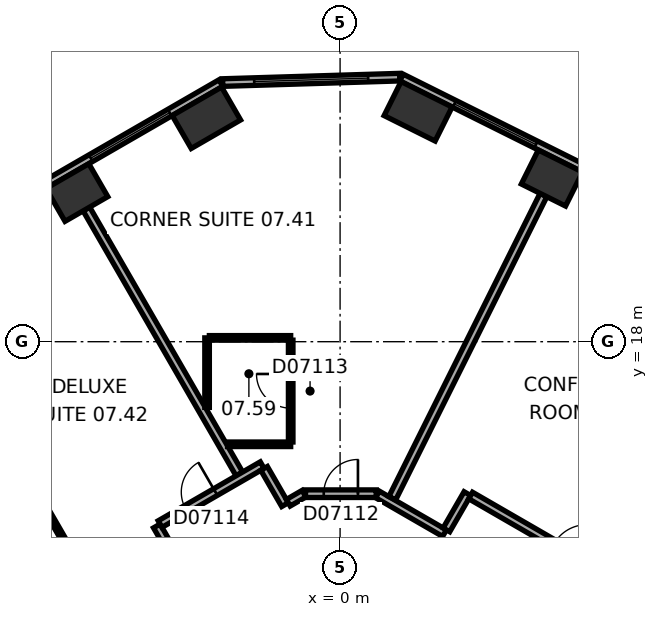
"""IFC4 building model, lengths in metres.
Left out: names, types, materials, properties, quantities, classifications, styles, units other than length and angle.
Written with IfcOpenShell. Run it as: python <this file> out.ifc"""

import sys

from ifc_helpers import new_model, si_unit, direction, frame, frame_2d, origin, origin_2d, place, context, subcontext, project, spatial, rectangle, extrude, element, fill, save


model = new_model("IFC4")
c1 = context("Model", 3, precision=1e-05, world=origin(), true_north=direction((0.0, 1.0)))
c2 = subcontext(c1, "Body", "Model", "MODEL_VIEW")
j1 = project(units=[si_unit("LENGTHUNIT", "METRE"), si_unit("PLANEANGLEUNIT", "RADIAN")], contexts=[c1])
p1 = place(None, origin())
s1 = spatial("IfcSite", under=j1, at=p1, CompositionType="ELEMENT")
p2 = place(p1, origin())
s2 = spatial("IfcBuilding", under=s1, at=p2, CompositionType="ELEMENT")
p3 = place(p2, frame((0.0, 0.0, 44.0)))
s3 = spatial("IfcBuildingStorey", under=s2, at=p3, CompositionType="ELEMENT", Elevation=44.0)
p4 = place(p3, frame((5.574, 22.306, 0.0), z_axis=(0.0, 0.0, 1.0), x_axis=(-0.894934361602, 0.44619781311, 0.0)))
e1 = element("IfcColumn", 1, at=p4, inside=s3, PredefinedType="COLUMN", context=c2, shape_type="SweptSolid", body=[
    extrude(rectangle(XDim=1.3, YDim=1.0, at=origin_2d()), origin(), (0.0, 0.0, 1.0), 3.3),
])
for number, where, z_axis, x_axis in (
    (2, (2.053, 24.062, 0.0), (0.0, 0.0, 1.0), (-0.895, 0.446, 0.0)),
    (3, (-3.518, 23.892, 0.0), (0.0, 0.0, 1.0), (-0.866, -0.5, 0.0)),
):
    element("IfcColumn", number, at=place(p3, frame(where, z_axis=z_axis, x_axis=x_axis)), inside=s3, PredefinedType="COLUMN", context=c2, shape_type="SweptSolid", body=[
        extrude(rectangle(XDim=1.5, YDim=1.0, at=origin_2d()), origin(), (0.0, 0.0, 1.0), 3.3),
    ])
p5 = place(p3, frame((-6.926, 21.925, 0.0), z_axis=(0.0, 0.0, 1.0), x_axis=(-0.866025403784, -0.5, 0.0)))
e4 = element("IfcColumn", 4, at=p5, inside=s3, PredefinedType="COLUMN", context=c2, shape_type="SweptSolid", body=[
    extrude(rectangle(XDim=1.3, YDim=1.0, at=origin_2d()), origin(), (0.0, 0.0, 1.0), 3.3),
])
p6 = place(p3, frame((20.63, 15.47, 0.0), z_axis=(0.0, 0.0, 1.0), x_axis=(-0.894934518609, 0.446197498203, 0.0)))
e5 = element("IfcWall", 5, at=p6, inside=s3, PredefinedType="STANDARD", context=c2, shape_type="SweptSolid", body=[
    extrude(rectangle(XDim=21.246, YDim=0.2, at=frame_2d((10.623, 0.0))), origin(), (0.0, 0.0, 1.0), 3.3),
])
p7 = place(p6, frame((1.553, 0.0, 0.8)))
e6 = element("IfcOpeningElement", 6, at=p7, cuts=e5, PredefinedType="OPENING", context=c2, shape_type="SweptSolid", body=[
    extrude(rectangle(XDim=2.4, YDim=1.7, at=frame_2d((1.2, 0.85))), frame((0.0, 0.11, 0.0), z_axis=(0.0, -1.0, 0.0), x_axis=(1.0, 0.0, 0.0)), (0.0, 0.0, 1.0), 0.22),
])
p8 = place(p6, frame((5.488, 0.0, 0.8)))
e7 = element("IfcOpeningElement", 7, at=p8, cuts=e5, PredefinedType="OPENING", context=c2, shape_type="SweptSolid", body=[
    extrude(rectangle(XDim=2.4, YDim=1.7, at=frame_2d((1.2, 0.85))), frame((0.0, 0.11, 0.0), z_axis=(0.0, -1.0, 0.0), x_axis=(1.0, 0.0, 0.0)), (0.0, 0.0, 1.0), 0.22),
])
p9 = place(p6, frame((9.422, 0.0, 0.8)))
e8 = element("IfcOpeningElement", 8, at=p9, cuts=e5, PredefinedType="OPENING", context=c2, shape_type="SweptSolid", body=[
    extrude(rectangle(XDim=2.4, YDim=1.7, at=frame_2d((1.2, 0.85))), frame((0.0, 0.11, 0.0), z_axis=(0.0, -1.0, 0.0), x_axis=(1.0, 0.0, 0.0)), (0.0, 0.0, 1.0), 0.22),
])
p10 = place(p6, frame((13.357, 0.0, 0.8)))
e9 = element("IfcOpeningElement", 9, at=p10, cuts=e5, PredefinedType="OPENING", context=c2, shape_type="SweptSolid", body=[
    extrude(rectangle(XDim=2.4, YDim=1.7, at=frame_2d((1.2, 0.85))), frame((0.0, 0.11, 0.0), z_axis=(0.0, -1.0, 0.0), x_axis=(1.0, 0.0, 0.0)), (0.0, 0.0, 1.0), 0.22),
])
p11 = place(p6, frame((17.292, 0.0, 0.8)))
e10 = element("IfcOpeningElement", 10, at=p11, cuts=e5, PredefinedType="OPENING", context=c2, shape_type="SweptSolid", body=[
    extrude(rectangle(XDim=2.4, YDim=1.7, at=frame_2d((1.2, 0.85))), frame((0.0, 0.11, 0.0), z_axis=(0.0, -1.0, 0.0), x_axis=(1.0, 0.0, 0.0)), (0.0, 0.0, 1.0), 0.22),
])
p12 = place(p3, frame((1.568, 24.961, 0.0), z_axis=(0.0, 0.0, 1.0), x_axis=(-0.999533359013, -0.030546099927, 0.0)))
e11 = element("IfcWall", 11, at=p12, inside=s3, PredefinedType="STANDARD", context=c2, shape_type="SweptSolid", body=[
    extrude(rectangle(XDim=4.66, YDim=0.2, at=frame_2d((2.33, 0.0))), origin(), (0.0, 0.0, 1.0), 3.3),
])
p13 = place(p12, frame((0.83, 0.0, 0.8)))
e12 = element("IfcOpeningElement", 12, at=p13, cuts=e11, PredefinedType="OPENING", context=c2, shape_type="SweptSolid", body=[
    extrude(rectangle(XDim=3.0, YDim=1.7, at=frame_2d((1.5, 0.85))), frame((0.0, 0.11, 0.0), z_axis=(0.0, -1.0, 0.0), x_axis=(1.0, 0.0, 0.0)), (0.0, 0.0, 1.0), 0.22),
])
p14 = place(p3, frame((-3.136, 24.805, 0.0), z_axis=(0.0, 0.0, 1.0), x_axis=(-0.866028291626, -0.499994998079, 0.0)))
e13 = element("IfcWall", 13, at=p14, inside=s3, PredefinedType="STANDARD", context=c2, shape_type="SweptSolid", body=[
    extrude(rectangle(XDim=21.246, YDim=0.2, at=frame_2d((10.623, 0.0))), origin(), (0.0, 0.0, 1.0), 3.3),
])
p15 = place(p14, frame((1.555, 0.0, 0.8)))
e14 = element("IfcOpeningElement", 14, at=p15, cuts=e13, PredefinedType="OPENING", context=c2, shape_type="SweptSolid", body=[
    extrude(rectangle(XDim=2.4, YDim=1.7, at=frame_2d((1.2, 0.85))), frame((0.0, 0.11, 0.0), z_axis=(0.0, -1.0, 0.0), x_axis=(1.0, 0.0, 0.0)), (0.0, 0.0, 1.0), 0.22),
])
p16 = place(p14, frame((5.489, 0.0, 0.8)))
e15 = element("IfcOpeningElement", 15, at=p16, cuts=e13, PredefinedType="OPENING", context=c2, shape_type="SweptSolid", body=[
    extrude(rectangle(XDim=2.4, YDim=1.7, at=frame_2d((1.2, 0.85))), frame((0.0, 0.11, 0.0), z_axis=(0.0, -1.0, 0.0), x_axis=(1.0, 0.0, 0.0)), (0.0, 0.0, 1.0), 0.22),
])
p17 = place(p14, frame((9.424, 0.0, 0.8)))
e16 = element("IfcOpeningElement", 16, at=p17, cuts=e13, PredefinedType="OPENING", context=c2, shape_type="SweptSolid", body=[
    extrude(rectangle(XDim=2.4, YDim=1.7, at=frame_2d((1.2, 0.85))), frame((0.0, 0.11, 0.0), z_axis=(0.0, -1.0, 0.0), x_axis=(1.0, 0.0, 0.0)), (0.0, 0.0, 1.0), 0.22),
])
p18 = place(p14, frame((13.358, 0.0, 0.8)))
e17 = element("IfcOpeningElement", 17, at=p18, cuts=e13, PredefinedType="OPENING", context=c2, shape_type="SweptSolid", body=[
    extrude(rectangle(XDim=2.4, YDim=1.7, at=frame_2d((1.2, 0.85))), frame((0.0, 0.11, 0.0), z_axis=(0.0, -1.0, 0.0), x_axis=(1.0, 0.0, 0.0)), (0.0, 0.0, 1.0), 0.22),
])
p19 = place(p14, frame((17.293, 0.0, 0.8)))
e18 = element("IfcOpeningElement", 18, at=p19, cuts=e13, PredefinedType="OPENING", context=c2, shape_type="SweptSolid", body=[
    extrude(rectangle(XDim=2.4, YDim=1.7, at=frame_2d((1.2, 0.85))), frame((0.0, 0.11, 0.0), z_axis=(0.0, -1.0, 0.0), x_axis=(1.0, 0.0, 0.0)), (0.0, 0.0, 1.0), 0.22),
])
p20 = place(p3, frame((-7.687, 13.506, 0.0), z_axis=(0.0, 0.0, 1.0), x_axis=(0.499985389037, -0.866033839264, 0.0)))
e19 = element("IfcWall", 19, at=p20, inside=s3, PredefinedType="PARTITIONING", context=c2, shape_type="SweptSolid", body=[
    extrude(rectangle(XDim=2.84, YDim=0.12, at=frame_2d((1.42, 0.0))), origin(), (0.0, 0.0, 1.0), 2.6),
])
p21 = place(p20, frame((0.97, 0.0, 0.0)))
e20 = element("IfcOpeningElement", 20, at=p21, cuts=e19, PredefinedType="OPENING", context=c2, shape_type="SweptSolid", body=[
    extrude(rectangle(XDim=0.9, YDim=2.1, at=frame_2d((0.45, 1.05))), frame((0.0, 0.07, 0.0), z_axis=(0.0, -1.0, 0.0), x_axis=(1.0, 0.0, 0.0)), (0.0, 0.0, 1.0), 0.14),
])
p22 = place(p3, frame((-6.676, 21.492, 0.0), z_axis=(0.0, 0.0, 1.0), x_axis=(0.500011263043, -0.866018900966, 0.0)))
e21 = element("IfcWall", 21, at=p22, inside=s3, PredefinedType="PARTITIONING", context=c2, shape_type="SweptSolid", body=[
    extrude(rectangle(XDim=8.049, YDim=0.2, at=frame_2d((4.024, 0.0))), origin(), (0.0, 0.0, 1.0), 3.05),
])
p23 = place(p3, frame((-4.823, 13.152, 0.0), z_axis=(0.0, 0.0, 1.0), x_axis=(0.499986357472, -0.866033280158, 0.0)))
e22 = element("IfcWall", 22, at=p23, inside=s3, PredefinedType="PARTITIONING", context=c2, shape_type="SweptSolid", body=[
    extrude(rectangle(XDim=1.201, YDim=0.2, at=frame_2d((0.601, 0.0))), origin(), (0.0, 0.0, 1.0), 3.05),
])
p24 = place(p3, frame((-3.5, 16.271, 0.0), z_axis=(0.0, 0.0, 1.0), x_axis=(0.0, 1.0, 0.0)))
e23 = element("IfcWall", 23, at=p24, inside=s3, PredefinedType="PARTITIONING", context=c2, shape_type="SweptSolid", body=[
    extrude(rectangle(XDim=1.829, YDim=0.12, at=frame_2d((0.915, 0.0))), origin(), (0.0, 0.0, 1.0), 3.05),
])
p25 = place(p3, frame((-3.44, 18.101, 0.0), z_axis=(0.0, 0.0, 1.0), x_axis=(1.0, 0.0, 0.0)))
e24 = element("IfcWall", 24, at=p25, inside=s3, PredefinedType="PARTITIONING", context=c2, shape_type="SweptSolid", body=[
    extrude(rectangle(XDim=2.14, YDim=0.12, at=frame_2d((1.07, 0.0))), origin(), (0.0, 0.0, 1.0), 3.05),
])
p26 = place(p3, frame((-2.05, 14.752, 0.0), z_axis=(0.0, 0.0, 1.0), x_axis=(-0.866030936828, -0.499990416364, 0.0)))
e25 = element("IfcWall", 25, at=p26, inside=s3, PredefinedType="PARTITIONING", context=c2, shape_type="SweptSolid", body=[
    extrude(rectangle(XDim=3.102, YDim=0.2, at=frame_2d((1.551, 0.0))), origin(), (0.0, 0.0, 1.0), 3.05),
])
p27 = place(p26, frame((1.419, 0.0, 0.0)))
e26 = element("IfcOpeningElement", 26, at=p27, cuts=e25, PredefinedType="OPENING", context=c2, shape_type="SweptSolid", body=[
    extrude(rectangle(XDim=0.9, YDim=2.1, at=frame_2d((0.45, 1.05))), frame((0.0, 0.11, 0.0), z_axis=(0.0, -1.0, 0.0), x_axis=(1.0, 0.0, 0.0)), (0.0, 0.0, 1.0), 0.22),
])
p28 = place(p3, frame((-1.449, 13.712, 0.0), z_axis=(0.0, 0.0, 1.0), x_axis=(-0.499978356969, 0.866037899034, 0.0)))
e27 = element("IfcWall", 27, at=p28, inside=s3, PredefinedType="PARTITIONING", context=c2, shape_type="SweptSolid", body=[
    extrude(rectangle(XDim=1.101, YDim=0.2, at=frame_2d((0.551, 0.0))), origin(), (0.0, 0.0, 1.0), 3.05),
])
p29 = place(p3, frame((-1.3, 15.301, 0.0), z_axis=(0.0, 0.0, 1.0), x_axis=(-1.0, 0.0, 0.0)))
e28 = element("IfcWall", 28, at=p29, inside=s3, PredefinedType="PARTITIONING", context=c2, shape_type="SweptSolid", body=[
    extrude(rectangle(XDim=1.661, YDim=0.12, at=frame_2d((0.831, 0.0))), origin(), (0.0, 0.0, 1.0), 3.05),
])
p30 = place(p3, frame((-1.3, 18.041, 0.0), z_axis=(0.0, 0.0, 1.0), x_axis=(0.0, -1.0, 0.0)))
e29 = element("IfcWall", 29, at=p30, inside=s3, PredefinedType="PARTITIONING", context=c2, shape_type="SweptSolid", body=[
    extrude(rectangle(XDim=2.68, YDim=0.12, at=frame_2d((1.34, 0.0))), origin(), (0.0, 0.0, 1.0), 3.05),
])
p31 = place(p30, frame((0.89, 0.0, 0.0)))
e30 = element("IfcOpeningElement", 30, at=p31, cuts=e29, PredefinedType="OPENING", context=c2, shape_type="SweptSolid", body=[
    extrude(rectangle(XDim=0.9, YDim=2.1, at=frame_2d((0.45, 1.05))), frame((0.0, 0.07, 0.0), z_axis=(0.0, -1.0, 0.0), x_axis=(1.0, 0.0, 0.0)), (0.0, 0.0, 1.0), 0.14),
])
p32 = place(p3, frame((-0.95, 14.001, 0.0), z_axis=(0.0, 0.0, 1.0), x_axis=(-0.86609177584, -0.499885022602, 0.0)))
e31 = element("IfcWall", 31, at=p32, inside=s3, PredefinedType="PARTITIONING", context=c2, shape_type="SweptSolid", body=[
    extrude(rectangle(XDim=0.477, YDim=0.2, at=frame_2d((0.238, 0.0))), origin(), (0.0, 0.0, 1.0), 3.05),
])
p33 = place(p3, frame((0.95, 14.001, 0.0), z_axis=(0.0, 0.0, 1.0), x_axis=(-1.0, 0.0, 0.0)))
e32 = element("IfcWall", 32, at=p33, inside=s3, PredefinedType="PARTITIONING", context=c2, shape_type="SweptSolid", body=[
    extrude(rectangle(XDim=1.86, YDim=0.2, at=frame_2d((0.93, 0.0))), origin(), (0.0, 0.0, 1.0), 3.05),
])
p34 = place(p33, frame((0.48, 0.0, 0.0)))
e33 = element("IfcOpeningElement", 33, at=p34, cuts=e32, PredefinedType="OPENING", context=c2, shape_type="SweptSolid", body=[
    extrude(rectangle(XDim=0.9, YDim=2.1, at=frame_2d((0.45, 1.05))), frame((0.0, 0.11, 0.0), z_axis=(0.0, -1.0, 0.0), x_axis=(1.0, 0.0, 0.0)), (0.0, 0.0, 1.0), 0.22),
])
p35 = place(p3, frame((2.748, 12.962, 0.0), z_axis=(0.0, 0.0, 1.0), x_axis=(-0.866013897511, 0.50001992892, 0.0)))
e34 = element("IfcWall", 34, at=p35, inside=s3, PredefinedType="PARTITIONING", context=c2, shape_type="SweptSolid", body=[
    extrude(rectangle(XDim=2.037, YDim=0.2, at=frame_2d((1.018, 0.0))), origin(), (0.0, 0.0, 1.0), 3.05),
])
p36 = place(p3, frame((3.349, 14.002, 0.0), z_axis=(0.0, 0.0, 1.0), x_axis=(-0.500074377092, -0.865982457891, 0.0)))
e35 = element("IfcWall", 35, at=p36, inside=s3, PredefinedType="PARTITIONING", context=c2, shape_type="SweptSolid", body=[
    extrude(rectangle(XDim=1.101, YDim=0.2, at=frame_2d((0.55, 0.0))), origin(), (0.0, 0.0, 1.0), 3.05),
])
p37 = place(p3, frame((5.351, 21.859, 0.0), z_axis=(0.0, 0.0, 1.0), x_axis=(-0.446205309328, -0.894930624086, 0.0)))
e36 = element("IfcWall", 36, at=p37, inside=s3, PredefinedType="PARTITIONING", context=c2, shape_type="SweptSolid", body=[
    extrude(rectangle(XDim=8.913, YDim=0.2, at=frame_2d((4.457, 0.0))), origin(), (0.0, 0.0, 1.0), 2.6),
])
p38 = place(p3, frame((10.885, 9.652, 0.0), z_axis=(0.0, 0.0, 1.0), x_axis=(-0.866033868542, 0.499985338323, 0.0)))
e37 = element("IfcWall", 37, at=p38, inside=s3, PredefinedType="PARTITIONING", context=c2, shape_type="SweptSolid", body=[
    extrude(rectangle(XDim=8.602, YDim=0.2, at=frame_2d((4.301, 0.0))), origin(), (0.0, 0.0, 1.0), 3.05),
])
p39 = place(p38, frame((5.069, 0.0, 0.0)))
e38 = element("IfcOpeningElement", 38, at=p39, cuts=e37, PredefinedType="OPENING", context=c2, shape_type="SweptSolid", body=[
    extrude(rectangle(XDim=1.0, YDim=2.1, at=frame_2d((0.5, 1.05))), frame((0.0, 0.11, 0.0), z_axis=(0.0, -1.0, 0.0), x_axis=(1.0, 0.0, 0.0)), (0.0, 0.0, 1.0), 0.22),
])
p40 = place(p11, origin())
e39 = element("IfcWindow", 39, at=p40, inside=s3, PartitioningType="SINGLE_PANEL", PredefinedType="WINDOW", context=c2, shape_type="SweptSolid", body=[
    extrude(rectangle(XDim=2.4, YDim=1.7, at=frame_2d((1.2, 0.85))), frame((0.0, 0.03, 0.0), z_axis=(0.0, -1.0, 0.0), x_axis=(1.0, 0.0, 0.0)), (0.0, 0.0, 1.0), 0.06),
])
fill(e10, e39)
p41 = place(p13, origin())
e40 = element("IfcWindow", 40, at=p41, inside=s3, PartitioningType="SINGLE_PANEL", PredefinedType="WINDOW", context=c2, shape_type="SweptSolid", body=[
    extrude(rectangle(XDim=3.0, YDim=1.7, at=frame_2d((1.5, 0.85))), frame((0.0, 0.03, 0.0), z_axis=(0.0, -1.0, 0.0), x_axis=(1.0, 0.0, 0.0)), (0.0, 0.0, 1.0), 0.06),
])
fill(e12, e40)
p42 = place(p15, origin())
e41 = element("IfcWindow", 41, at=p42, inside=s3, PartitioningType="SINGLE_PANEL", PredefinedType="WINDOW", context=c2, shape_type="SweptSolid", body=[
    extrude(rectangle(XDim=2.4, YDim=1.7, at=frame_2d((1.2, 0.85))), frame((0.0, 0.03, 0.0), z_axis=(0.0, -1.0, 0.0), x_axis=(1.0, 0.0, 0.0)), (0.0, 0.0, 1.0), 0.06),
])
fill(e14, e41)
p43 = place(p34, origin())
e42 = element("IfcDoor", 42, at=p43, inside=s3, OperationType="SINGLE_SWING_LEFT", PredefinedType="DOOR", context=c2, shape_type="SweptSolid", body=[
    extrude(rectangle(XDim=0.9, YDim=2.1, at=frame_2d((0.45, 1.05))), frame((0.0, 0.025, 0.0), z_axis=(0.0, -1.0, 0.0), x_axis=(1.0, 0.0, 0.0)), (0.0, 0.0, 1.0), 0.05),
])
fill(e33, e42)
p44 = place(p31, origin())
e43 = element("IfcDoor", 43, at=p44, inside=s3, OperationType="SINGLE_SWING_LEFT", PredefinedType="DOOR", context=c2, shape_type="SweptSolid", body=[
    extrude(rectangle(XDim=0.9, YDim=2.1, at=frame_2d((0.45, 1.05))), frame((0.0, 0.025, 0.0), z_axis=(0.0, -1.0, 0.0), x_axis=(1.0, 0.0, 0.0)), (0.0, 0.0, 1.0), 0.05),
])
fill(e30, e43)
p45 = place(p27, origin())
e44 = element("IfcDoor", 44, at=p45, inside=s3, OperationType="SINGLE_SWING_LEFT", PredefinedType="DOOR", context=c2, shape_type="SweptSolid", body=[
    extrude(rectangle(XDim=0.9, YDim=2.1, at=frame_2d((0.45, 1.05))), frame((0.0, 0.025, 0.0), z_axis=(0.0, -1.0, 0.0), x_axis=(1.0, 0.0, 0.0)), (0.0, 0.0, 1.0), 0.05),
])
fill(e26, e44)
save(model, sys.argv[1])
